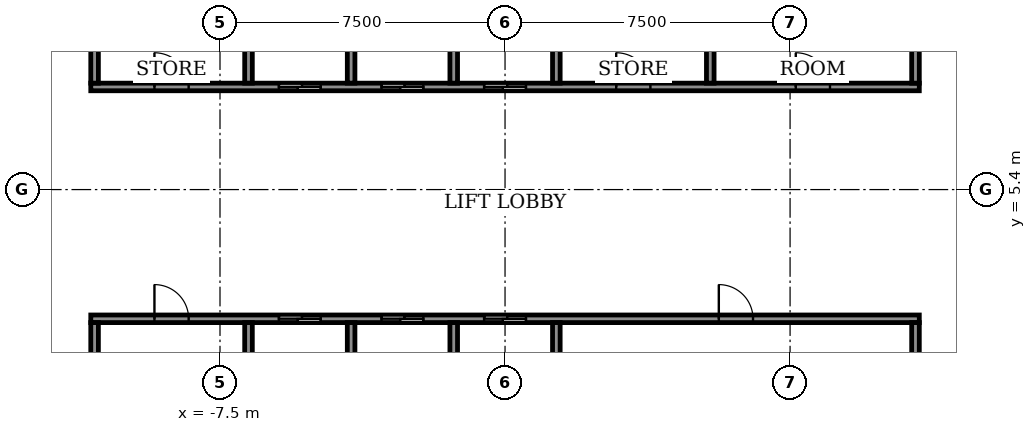
"""IFC4 building model, lengths in metres.
Left out: names, types, materials, properties, quantities, classifications, styles, units other than length and angle.
Written with IfcOpenShell. Run it as: python <this file> out.ifc"""

import sys

from ifc_helpers import new_model, si_unit, direction, frame, frame_2d, origin, place, context, subcontext, project, spatial, rectangle, extrude, element, fill, save


model = new_model("IFC4")
c1 = context("Model", 3, precision=1e-05, world=origin(), true_north=direction((0.0, 1.0)))
c2 = subcontext(c1, "Body", "Model", "MODEL_VIEW")
j1 = project(units=[si_unit("LENGTHUNIT", "METRE"), si_unit("PLANEANGLEUNIT", "RADIAN")], contexts=[c1])
p1 = place(None, origin())
s1 = spatial("IfcSite", under=j1, at=p1, CompositionType="ELEMENT")
p2 = place(p1, origin())
s2 = spatial("IfcBuilding", under=s1, at=p2, CompositionType="ELEMENT")
p3 = place(p2, frame((0.0, 0.0, 324.1)))
s3 = spatial("IfcBuildingStorey", under=s2, at=p3, CompositionType="ELEMENT", Elevation=324.1)
p4 = place(p3, frame((-10.9, 2.0, 0.0), z_axis=(0.0, 0.0, 1.0), x_axis=(1.0, 0.0, 0.0)))
e1 = element("IfcWall", 1, at=p4, inside=s3, PredefinedType="SHEAR", context=c2, shape_type="SweptSolid", body=[
    extrude(rectangle(XDim=21.8, YDim=0.2, at=frame_2d((10.9, 0.0))), origin(), (0.0, 0.0, 1.0), 5.05),
])
p5 = place(p4, frame((4.95, 0.0, 0.0)))
e2 = element("IfcOpeningElement", 2, at=p5, cuts=e1, PredefinedType="OPENING", context=c2, shape_type="SweptSolid", body=[
    extrude(rectangle(XDim=1.1, YDim=2.1, at=frame_2d((0.55, 1.05))), frame((0.0, 0.11, 0.0), z_axis=(0.0, -1.0, 0.0), x_axis=(1.0, 0.0, 0.0)), (0.0, 0.0, 1.0), 0.22),
])
p6 = place(p4, frame((7.65, 0.0, 0.0)))
e3 = element("IfcOpeningElement", 3, at=p6, cuts=e1, PredefinedType="OPENING", context=c2, shape_type="SweptSolid", body=[
    extrude(rectangle(XDim=1.1, YDim=2.1, at=frame_2d((0.55, 1.05))), frame((0.0, 0.11, 0.0), z_axis=(0.0, -1.0, 0.0), x_axis=(1.0, 0.0, 0.0)), (0.0, 0.0, 1.0), 0.22),
])
p7 = place(p4, frame((10.35, 0.0, 0.0)))
e4 = element("IfcOpeningElement", 4, at=p7, cuts=e1, PredefinedType="OPENING", context=c2, shape_type="SweptSolid", body=[
    extrude(rectangle(XDim=1.1, YDim=2.1, at=frame_2d((0.55, 1.05))), frame((0.0, 0.11, 0.0), z_axis=(0.0, -1.0, 0.0), x_axis=(1.0, 0.0, 0.0)), (0.0, 0.0, 1.0), 0.22),
])
p8 = place(p4, frame((1.675, 0.0, 0.0)))
e5 = element("IfcOpeningElement", 5, at=p8, cuts=e1, PredefinedType="OPENING", context=c2, shape_type="SweptSolid", body=[
    extrude(rectangle(XDim=0.9, YDim=2.1, at=frame_2d((0.45, 1.05))), frame((0.0, 0.11, 0.0), z_axis=(0.0, -1.0, 0.0), x_axis=(1.0, 0.0, 0.0)), (0.0, 0.0, 1.0), 0.22),
])
p9 = place(p4, frame((16.525, 0.0, 0.0)))
e6 = element("IfcOpeningElement", 6, at=p9, cuts=e1, PredefinedType="OPENING", context=c2, shape_type="SweptSolid", body=[
    extrude(rectangle(XDim=0.9, YDim=2.1, at=frame_2d((0.45, 1.05))), frame((0.0, 0.11, 0.0), z_axis=(0.0, -1.0, 0.0), x_axis=(1.0, 0.0, 0.0)), (0.0, 0.0, 1.0), 0.22),
])
p10 = place(p3, frame((-10.9, 8.1, 0.0), z_axis=(0.0, 0.0, 1.0), x_axis=(1.0, 0.0, 0.0)))
e7 = element("IfcWall", 7, at=p10, inside=s3, PredefinedType="SHEAR", context=c2, shape_type="SweptSolid", body=[
    extrude(rectangle(XDim=21.8, YDim=0.2, at=frame_2d((10.9, 0.0))), origin(), (0.0, 0.0, 1.0), 5.05),
])
p11 = place(p10, frame((4.95, 0.0, 0.0)))
e8 = element("IfcOpeningElement", 8, at=p11, cuts=e7, PredefinedType="OPENING", context=c2, shape_type="SweptSolid", body=[
    extrude(rectangle(XDim=1.1, YDim=2.1, at=frame_2d((0.55, 1.05))), frame((0.0, 0.11, 0.0), z_axis=(0.0, -1.0, 0.0), x_axis=(1.0, 0.0, 0.0)), (0.0, 0.0, 1.0), 0.22),
])
p12 = place(p10, frame((7.65, 0.0, 0.0)))
e9 = element("IfcOpeningElement", 9, at=p12, cuts=e7, PredefinedType="OPENING", context=c2, shape_type="SweptSolid", body=[
    extrude(rectangle(XDim=1.1, YDim=2.1, at=frame_2d((0.55, 1.05))), frame((0.0, 0.11, 0.0), z_axis=(0.0, -1.0, 0.0), x_axis=(1.0, 0.0, 0.0)), (0.0, 0.0, 1.0), 0.22),
])
p13 = place(p10, frame((10.35, 0.0, 0.0)))
e10 = element("IfcOpeningElement", 10, at=p13, cuts=e7, PredefinedType="OPENING", context=c2, shape_type="SweptSolid", body=[
    extrude(rectangle(XDim=1.1, YDim=2.1, at=frame_2d((0.55, 1.05))), frame((0.0, 0.11, 0.0), z_axis=(0.0, -1.0, 0.0), x_axis=(1.0, 0.0, 0.0)), (0.0, 0.0, 1.0), 0.22),
])
p14 = place(p10, frame((1.675, 0.0, 0.0)))
e11 = element("IfcOpeningElement", 11, at=p14, cuts=e7, PredefinedType="OPENING", context=c2, shape_type="SweptSolid", body=[
    extrude(rectangle(XDim=0.9, YDim=2.1, at=frame_2d((0.45, 1.05))), frame((0.0, 0.11, 0.0), z_axis=(0.0, -1.0, 0.0), x_axis=(1.0, 0.0, 0.0)), (0.0, 0.0, 1.0), 0.22),
])
p15 = place(p10, frame((13.825, 0.0, 0.0)))
e12 = element("IfcOpeningElement", 12, at=p15, cuts=e7, PredefinedType="OPENING", context=c2, shape_type="SweptSolid", body=[
    extrude(rectangle(XDim=0.9, YDim=2.1, at=frame_2d((0.45, 1.05))), frame((0.0, 0.11, 0.0), z_axis=(0.0, -1.0, 0.0), x_axis=(1.0, 0.0, 0.0)), (0.0, 0.0, 1.0), 0.22),
])
p16 = place(p10, frame((18.55, 0.0, 0.0)))
e13 = element("IfcOpeningElement", 13, at=p16, cuts=e7, PredefinedType="OPENING", context=c2, shape_type="SweptSolid", body=[
    extrude(rectangle(XDim=0.9, YDim=2.1, at=frame_2d((0.45, 1.05))), frame((0.0, 0.11, 0.0), z_axis=(0.0, -1.0, 0.0), x_axis=(1.0, 0.0, 0.0)), (0.0, 0.0, 1.0), 0.22),
])
p17 = place(p3, frame((-10.8, -0.6, 0.0), z_axis=(0.0, 0.0, 1.0), x_axis=(0.0, 1.0, 0.0)))
e14 = element("IfcWall", 14, at=p17, inside=s3, PredefinedType="STANDARD", context=c2, shape_type="SweptSolid", body=[
    extrude(rectangle(XDim=2.5, YDim=0.2, at=frame_2d((1.25, 0.0))), origin(), (0.0, 0.0, 1.0), 5.05),
])
for number, where, z_axis, x_axis in (
    (15, (-6.75, -0.6, 0.0), (0.0, 0.0, 1.0), (0.0, 1.0, 0.0)),
    (16, (-4.05, -0.6, 0.0), (0.0, 0.0, 1.0), (0.0, 1.0, 0.0)),
    (17, (-1.35, -0.6, 0.0), (0.0, 0.0, 1.0), (0.0, 1.0, 0.0)),
    (18, (1.35, -0.6, 0.0), (0.0, 0.0, 1.0), (0.0, 1.0, 0.0)),
):
    element("IfcWall", number, at=place(p3, frame(where, z_axis=z_axis, x_axis=x_axis)), inside=s3, PredefinedType="SHEAR", context=c2, shape_type="SweptSolid", body=[
        extrude(rectangle(XDim=2.5, YDim=0.2, at=frame_2d((1.25, 0.0))), origin(), (0.0, 0.0, 1.0), 5.05),
    ])
p18 = place(p3, frame((10.8, -0.6, 0.0), z_axis=(0.0, 0.0, 1.0), x_axis=(0.0, 1.0, 0.0)))
e19 = element("IfcWall", 19, at=p18, inside=s3, PredefinedType="STANDARD", context=c2, shape_type="SweptSolid", body=[
    extrude(rectangle(XDim=2.5, YDim=0.2, at=frame_2d((1.25, 0.0))), origin(), (0.0, 0.0, 1.0), 5.05),
])
p19 = place(p3, frame((-10.8, 8.2, 0.0), z_axis=(0.0, 0.0, 1.0), x_axis=(0.0, 1.0, 0.0)))
e20 = element("IfcWall", 20, at=p19, inside=s3, PredefinedType="STANDARD", context=c2, shape_type="SweptSolid", body=[
    extrude(rectangle(XDim=2.6, YDim=0.2, at=frame_2d((1.3, 0.0))), origin(), (0.0, 0.0, 1.0), 5.05),
])
for number, where, z_axis, x_axis in (
    (21, (-6.75, 8.2, 0.0), (0.0, 0.0, 1.0), (0.0, 1.0, 0.0)),
    (22, (-4.05, 8.2, 0.0), (0.0, 0.0, 1.0), (0.0, 1.0, 0.0)),
    (23, (-1.35, 8.2, 0.0), (0.0, 0.0, 1.0), (0.0, 1.0, 0.0)),
    (24, (1.35, 8.2, 0.0), (0.0, 0.0, 1.0), (0.0, 1.0, 0.0)),
):
    element("IfcWall", number, at=place(p3, frame(where, z_axis=z_axis, x_axis=x_axis)), inside=s3, PredefinedType="SHEAR", context=c2, shape_type="SweptSolid", body=[
        extrude(rectangle(XDim=2.6, YDim=0.2, at=frame_2d((1.3, 0.0))), origin(), (0.0, 0.0, 1.0), 5.05),
    ])
for number, where, z_axis, x_axis in (
    (25, (5.4, 8.2, 0.0), (0.0, 0.0, 1.0), (0.0, 1.0, 0.0)),
    (26, (10.8, 8.2, 0.0), (0.0, 0.0, 1.0), (0.0, 1.0, 0.0)),
):
    element("IfcWall", number, at=place(p3, frame(where, z_axis=z_axis, x_axis=x_axis)), inside=s3, PredefinedType="STANDARD", context=c2, shape_type="SweptSolid", body=[
        extrude(rectangle(XDim=2.6, YDim=0.2, at=frame_2d((1.3, 0.0))), origin(), (0.0, 0.0, 1.0), 5.05),
    ])
p20 = place(p5, origin())
e27 = element("IfcDoor", 27, at=p20, inside=s3, OperationType="SLIDING_TO_LEFT", PredefinedType="DOOR", context=c2, shape_type="SweptSolid", body=[
    extrude(rectangle(XDim=1.1, YDim=2.1, at=frame_2d((0.55, 1.05))), frame((0.0, 0.025, 0.0), z_axis=(0.0, -1.0, 0.0), x_axis=(1.0, 0.0, 0.0)), (0.0, 0.0, 1.0), 0.05),
])
fill(e2, e27)
p21 = place(p6, origin())
e28 = element("IfcDoor", 28, at=p21, inside=s3, OperationType="SLIDING_TO_LEFT", PredefinedType="DOOR", context=c2, shape_type="SweptSolid", body=[
    extrude(rectangle(XDim=1.1, YDim=2.1, at=frame_2d((0.55, 1.05))), frame((0.0, 0.025, 0.0), z_axis=(0.0, -1.0, 0.0), x_axis=(1.0, 0.0, 0.0)), (0.0, 0.0, 1.0), 0.05),
])
fill(e3, e28)
p22 = place(p7, origin())
e29 = element("IfcDoor", 29, at=p22, inside=s3, OperationType="SLIDING_TO_LEFT", PredefinedType="DOOR", context=c2, shape_type="SweptSolid", body=[
    extrude(rectangle(XDim=1.1, YDim=2.1, at=frame_2d((0.55, 1.05))), frame((0.0, 0.025, 0.0), z_axis=(0.0, -1.0, 0.0), x_axis=(1.0, 0.0, 0.0)), (0.0, 0.0, 1.0), 0.05),
])
fill(e4, e29)
p23 = place(p11, origin())
e30 = element("IfcDoor", 30, at=p23, inside=s3, OperationType="SLIDING_TO_LEFT", PredefinedType="DOOR", context=c2, shape_type="SweptSolid", body=[
    extrude(rectangle(XDim=1.1, YDim=2.1, at=frame_2d((0.55, 1.05))), frame((0.0, 0.025, 0.0), z_axis=(0.0, -1.0, 0.0), x_axis=(1.0, 0.0, 0.0)), (0.0, 0.0, 1.0), 0.05),
])
fill(e8, e30)
p24 = place(p12, origin())
e31 = element("IfcDoor", 31, at=p24, inside=s3, OperationType="SLIDING_TO_LEFT", PredefinedType="DOOR", context=c2, shape_type="SweptSolid", body=[
    extrude(rectangle(XDim=1.1, YDim=2.1, at=frame_2d((0.55, 1.05))), frame((0.0, 0.025, 0.0), z_axis=(0.0, -1.0, 0.0), x_axis=(1.0, 0.0, 0.0)), (0.0, 0.0, 1.0), 0.05),
])
fill(e9, e31)
p25 = place(p13, origin())
e32 = element("IfcDoor", 32, at=p25, inside=s3, OperationType="SLIDING_TO_LEFT", PredefinedType="DOOR", context=c2, shape_type="SweptSolid", body=[
    extrude(rectangle(XDim=1.1, YDim=2.1, at=frame_2d((0.55, 1.05))), frame((0.0, 0.025, 0.0), z_axis=(0.0, -1.0, 0.0), x_axis=(1.0, 0.0, 0.0)), (0.0, 0.0, 1.0), 0.05),
])
fill(e10, e32)
p26 = place(p8, origin())
e33 = element("IfcDoor", 33, at=p26, inside=s3, OperationType="SINGLE_SWING_RIGHT", PredefinedType="DOOR", context=c2, shape_type="SweptSolid", body=[
    extrude(rectangle(XDim=0.9, YDim=2.1, at=frame_2d((0.45, 1.05))), frame((0.0, 0.025, 0.0), z_axis=(0.0, -1.0, 0.0), x_axis=(1.0, 0.0, 0.0)), (0.0, 0.0, 1.0), 0.05),
])
fill(e5, e33)
p27 = place(p9, origin())
e34 = element("IfcDoor", 34, at=p27, inside=s3, OperationType="SINGLE_SWING_RIGHT", PredefinedType="DOOR", context=c2, shape_type="SweptSolid", body=[
    extrude(rectangle(XDim=0.9, YDim=2.1, at=frame_2d((0.45, 1.05))), frame((0.0, 0.025, 0.0), z_axis=(0.0, -1.0, 0.0), x_axis=(1.0, 0.0, 0.0)), (0.0, 0.0, 1.0), 0.05),
])
fill(e6, e34)
p28 = place(p14, origin())
e35 = element("IfcDoor", 35, at=p28, inside=s3, OperationType="SINGLE_SWING_RIGHT", PredefinedType="DOOR", context=c2, shape_type="SweptSolid", body=[
    extrude(rectangle(XDim=0.9, YDim=2.1, at=frame_2d((0.45, 1.05))), frame((0.0, 0.025, 0.0), z_axis=(0.0, -1.0, 0.0), x_axis=(1.0, 0.0, 0.0)), (0.0, 0.0, 1.0), 0.05),
])
fill(e11, e35)
p29 = place(p15, origin())
e36 = element("IfcDoor", 36, at=p29, inside=s3, OperationType="SINGLE_SWING_RIGHT", PredefinedType="DOOR", context=c2, shape_type="SweptSolid", body=[
    extrude(rectangle(XDim=0.9, YDim=2.1, at=frame_2d((0.45, 1.05))), frame((0.0, 0.025, 0.0), z_axis=(0.0, -1.0, 0.0), x_axis=(1.0, 0.0, 0.0)), (0.0, 0.0, 1.0), 0.05),
])
fill(e12, e36)
p30 = place(p16, origin())
e37 = element("IfcDoor", 37, at=p30, inside=s3, OperationType="SINGLE_SWING_LEFT", PredefinedType="DOOR", context=c2, shape_type="SweptSolid", body=[
    extrude(rectangle(XDim=0.9, YDim=2.1, at=frame_2d((0.45, 1.05))), frame((0.0, 0.025, 0.0), z_axis=(0.0, -1.0, 0.0), x_axis=(1.0, 0.0, 0.0)), (0.0, 0.0, 1.0), 0.05),
])
fill(e13, e37)
save(model, sys.argv[1])
